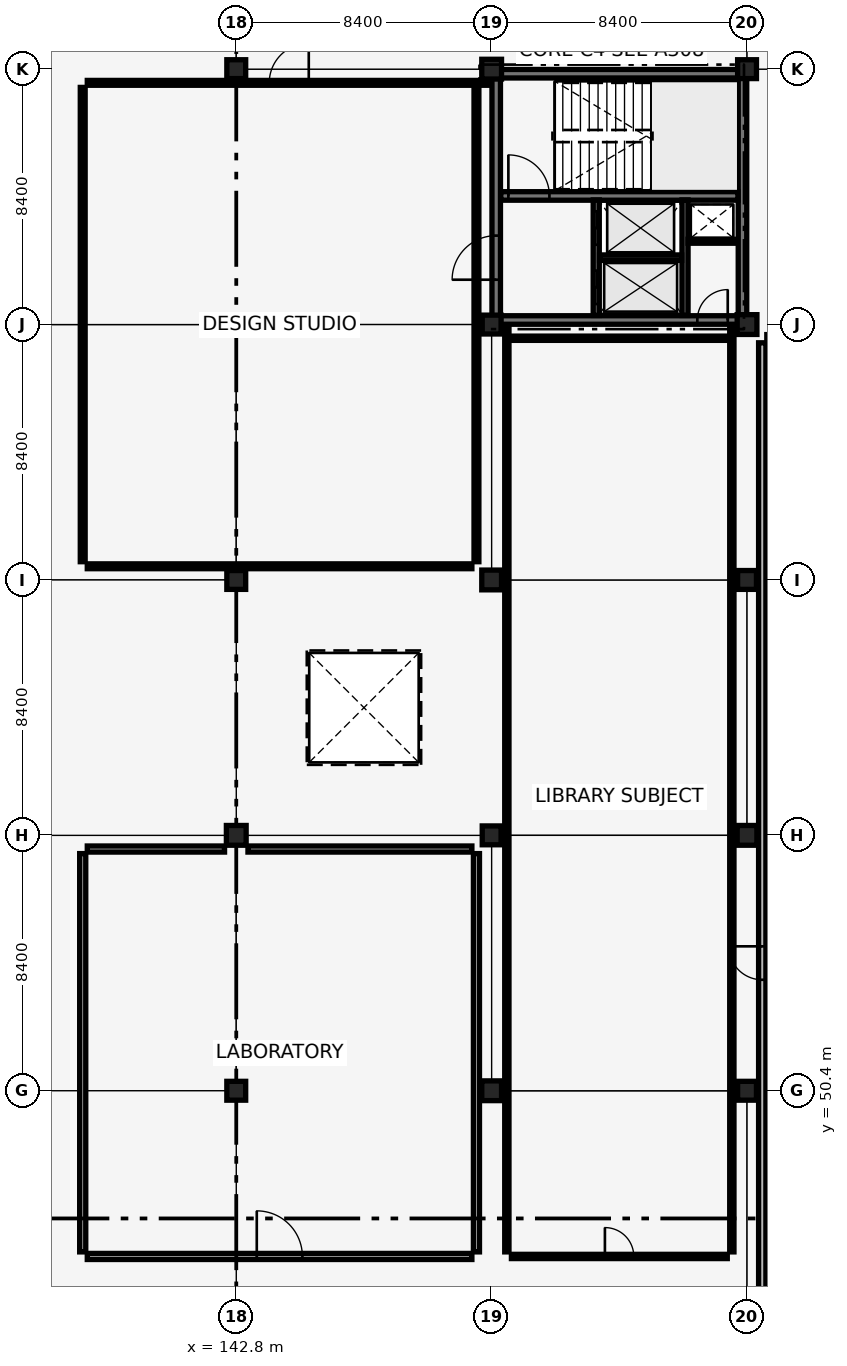
"""IFC4 building model, lengths in metres.
Left out: names, types, materials, properties, quantities, classifications, styles, units other than length and angle.
Written with IfcOpenShell. Run it as: python <this file> out.ifc"""

import sys

from ifc_helpers import new_model, si_unit, direction, frame, frame_2d, origin, origin_2d, place, context, subcontext, project, spatial, rectangle, extrude, element, fill, save


model = new_model("IFC4")
c1 = context("Model", 3, precision=1e-05, world=origin(), true_north=direction((0.0, 1.0)))
c2 = subcontext(c1, "Body", "Model", "MODEL_VIEW")
j1 = project(units=[si_unit("LENGTHUNIT", "METRE"), si_unit("PLANEANGLEUNIT", "RADIAN")], contexts=[c1])
p1 = place(None, origin())
s1 = spatial("IfcSite", under=j1, at=p1, CompositionType="ELEMENT")
p2 = place(p1, origin())
s2 = spatial("IfcBuilding", under=s1, at=p2, CompositionType="ELEMENT")
p3 = place(p2, frame((0.0, 0.0, 13.94)))
s3 = spatial("IfcBuildingStorey", under=s2, at=p3, CompositionType="ELEMENT", Elevation=13.94)
p4 = place(p3, frame((151.35, 75.75, 0.0), z_axis=(0.0, 0.0, 1.0), x_axis=(1.0, 0.0, 0.0)))
e1 = element("IfcWall", 1, at=p4, inside=s3, PredefinedType="SHEAR", context=c2, shape_type="SweptSolid", body=[
    extrude(rectangle(XDim=8.1, YDim=0.28, at=frame_2d((4.05, 0.0))), origin(), (0.0, 0.0, 1.0), 3.78),
])
p5 = place(p4, frame((6.615, 0.0, 0.0)))
e2 = element("IfcOpeningElement", 2, at=p5, cuts=e1, PredefinedType="OPENING", context=c2, shape_type="SweptSolid", body=[
    extrude(rectangle(XDim=1.0, YDim=2.15, at=frame_2d((0.5, 1.075))), frame((0.0, 0.15, 0.0), z_axis=(0.0, -1.0, 0.0), x_axis=(1.0, 0.0, 0.0)), (0.0, 0.0, 1.0), 0.3),
])
p6 = place(p3, frame((151.35, 83.85, 0.0), z_axis=(0.0, 0.0, 1.0), x_axis=(1.0, 0.0, 0.0)))
e3 = element("IfcWall", 3, at=p6, inside=s3, PredefinedType="SHEAR", context=c2, shape_type="SweptSolid", body=[
    extrude(rectangle(XDim=8.1, YDim=0.28, at=frame_2d((4.05, 0.0))), origin(), (0.0, 0.0, 1.0), 3.78),
])
p7 = place(p3, frame((151.35, 75.75, 0.0), z_axis=(0.0, 0.0, 1.0), x_axis=(0.0, 1.0, 0.0)))
e4 = element("IfcWall", 4, at=p7, inside=s3, PredefinedType="SHEAR", context=c2, shape_type="SweptSolid", body=[
    extrude(rectangle(XDim=8.1, YDim=0.28, at=frame_2d((4.05, 0.0))), origin(), (0.0, 0.0, 1.0), 3.78),
])
p8 = place(p7, frame((1.325, 0.0, 0.0)))
e5 = element("IfcOpeningElement", 5, at=p8, cuts=e4, PredefinedType="OPENING", context=c2, shape_type="SweptSolid", body=[
    extrude(rectangle(XDim=1.45, YDim=2.15, at=frame_2d((0.725, 1.075))), frame((0.0, 0.15, 0.0), z_axis=(0.0, -1.0, 0.0), x_axis=(1.0, 0.0, 0.0)), (0.0, 0.0, 1.0), 0.3),
])
p9 = place(p3, frame((159.45, 75.75, 0.0), z_axis=(0.0, 0.0, 1.0), x_axis=(0.0, 1.0, 0.0)))
e6 = element("IfcWall", 6, at=p9, inside=s3, PredefinedType="SHEAR", context=c2, shape_type="SweptSolid", body=[
    extrude(rectangle(XDim=8.1, YDim=0.28, at=frame_2d((4.05, 0.0))), origin(), (0.0, 0.0, 1.0), 3.78),
])
p10 = place(p3, frame((151.5, 79.83, 0.0), z_axis=(0.0, 0.0, 1.0), x_axis=(1.0, 0.0, 0.0)))
e7 = element("IfcWall", 7, at=p10, inside=s3, PredefinedType="SHEAR", context=c2, shape_type="SweptSolid", body=[
    extrude(rectangle(XDim=7.8, YDim=0.28, at=frame_2d((3.9, 0.0))), origin(), (0.0, 0.0, 1.0), 3.78),
])
p11 = place(p10, frame((0.25, 0.0, 0.0)))
e8 = element("IfcOpeningElement", 8, at=p11, cuts=e7, PredefinedType="OPENING", context=c2, shape_type="SweptSolid", body=[
    extrude(rectangle(XDim=1.35, YDim=2.15, at=frame_2d((0.675, 1.075))), frame((0.0, 0.15, 0.0), z_axis=(0.0, -1.0, 0.0), x_axis=(1.0, 0.0, 0.0)), (0.0, 0.0, 1.0), 0.3),
])
p12 = place(p3, frame((142.8, 50.4, 0.0), z_axis=(0.0, 0.0, 1.0), x_axis=(1.0, 0.0, 0.0)))
e9 = element("IfcColumn", 9, at=p12, inside=s3, PredefinedType="COLUMN", context=c2, shape_type="SweptSolid", body=[
    extrude(rectangle(XDim=0.62, YDim=0.62, at=origin_2d()), origin(), (0.0, 0.0, 1.0), 3.78),
])
p13 = place(p3, frame((142.8, 58.8, 0.0), z_axis=(0.0, 0.0, 1.0), x_axis=(1.0, 0.0, 0.0)))
e10 = element("IfcColumn", 10, at=p13, inside=s3, PredefinedType="COLUMN", context=c2, shape_type="SweptSolid", body=[
    extrude(rectangle(XDim=0.65, YDim=0.65, at=origin_2d()), origin(), (0.0, 0.0, 1.0), 3.78),
])
p14 = place(p3, frame((142.8, 67.2, 0.0), z_axis=(0.0, 0.0, 1.0), x_axis=(1.0, 0.0, 0.0)))
e11 = element("IfcColumn", 11, at=p14, inside=s3, PredefinedType="COLUMN", context=c2, shape_type="SweptSolid", body=[
    extrude(rectangle(XDim=0.62, YDim=0.62, at=origin_2d()), origin(), (0.0, 0.0, 1.0), 3.78),
])
p15 = place(p3, frame((142.8, 75.6, 0.0), z_axis=(0.0, 0.0, 1.0), x_axis=(1.0, 0.0, 0.0)))
e12 = element("IfcColumn", 12, at=p15, inside=s3, PredefinedType="COLUMN", context=c2, shape_type="SweptSolid", body=[
    extrude(rectangle(XDim=0.65, YDim=0.65, at=origin_2d()), origin(), (0.0, 0.0, 1.0), 3.78),
])
p16 = place(p3, frame((142.8, 84.0, 0.0), z_axis=(0.0, 0.0, 1.0), x_axis=(1.0, 0.0, 0.0)))
e13 = element("IfcColumn", 13, at=p16, inside=s3, PredefinedType="COLUMN", context=c2, shape_type="SweptSolid", body=[
    extrude(rectangle(XDim=0.62, YDim=0.62, at=origin_2d()), origin(), (0.0, 0.0, 1.0), 3.78),
])
p17 = place(p3, frame((151.2, 50.4, 0.0), z_axis=(0.0, 0.0, 1.0), x_axis=(1.0, 0.0, 0.0)))
e14 = element("IfcColumn", 14, at=p17, inside=s3, PredefinedType="COLUMN", context=c2, shape_type="SweptSolid", body=[
    extrude(rectangle(XDim=0.65, YDim=0.65, at=origin_2d()), origin(), (0.0, 0.0, 1.0), 3.78),
])
p18 = place(p3, frame((151.2, 58.8, 0.0), z_axis=(0.0, 0.0, 1.0), x_axis=(1.0, 0.0, 0.0)))
e15 = element("IfcColumn", 15, at=p18, inside=s3, PredefinedType="COLUMN", context=c2, shape_type="SweptSolid", body=[
    extrude(rectangle(XDim=0.62, YDim=0.62, at=origin_2d()), origin(), (0.0, 0.0, 1.0), 3.78),
])
p19 = place(p3, frame((151.2, 67.2, 0.0), z_axis=(0.0, 0.0, 1.0), x_axis=(1.0, 0.0, 0.0)))
e16 = element("IfcColumn", 16, at=p19, inside=s3, PredefinedType="COLUMN", context=c2, shape_type="SweptSolid", body=[
    extrude(rectangle(XDim=0.65, YDim=0.65, at=origin_2d()), origin(), (0.0, 0.0, 1.0), 3.78),
])
p20 = place(p3, frame((151.2, 75.6, 0.0), z_axis=(0.0, 0.0, 1.0), x_axis=(1.0, 0.0, 0.0)))
e17 = element("IfcColumn", 17, at=p20, inside=s3, PredefinedType="COLUMN", context=c2, shape_type="SweptSolid", body=[
    extrude(rectangle(XDim=0.62, YDim=0.62, at=origin_2d()), origin(), (0.0, 0.0, 1.0), 3.78),
])
p21 = place(p3, frame((151.2, 84.0, 0.0), z_axis=(0.0, 0.0, 1.0), x_axis=(1.0, 0.0, 0.0)))
e18 = element("IfcColumn", 18, at=p21, inside=s3, PredefinedType="COLUMN", context=c2, shape_type="SweptSolid", body=[
    extrude(rectangle(XDim=0.65, YDim=0.65, at=origin_2d()), origin(), (0.0, 0.0, 1.0), 3.78),
])
p22 = place(p3, frame((159.6, 50.4, 0.0), z_axis=(0.0, 0.0, 1.0), x_axis=(1.0, 0.0, 0.0)))
e19 = element("IfcColumn", 19, at=p22, inside=s3, PredefinedType="COLUMN", context=c2, shape_type="SweptSolid", body=[
    extrude(rectangle(XDim=0.62, YDim=0.62, at=origin_2d()), origin(), (0.0, 0.0, 1.0), 3.78),
])
p23 = place(p3, frame((159.6, 58.8, 0.0), z_axis=(0.0, 0.0, 1.0), x_axis=(1.0, 0.0, 0.0)))
e20 = element("IfcColumn", 20, at=p23, inside=s3, PredefinedType="COLUMN", context=c2, shape_type="SweptSolid", body=[
    extrude(rectangle(XDim=0.65, YDim=0.65, at=origin_2d()), origin(), (0.0, 0.0, 1.0), 3.78),
])
p24 = place(p3, frame((159.6, 67.2, 0.0), z_axis=(0.0, 0.0, 1.0), x_axis=(1.0, 0.0, 0.0)))
e21 = element("IfcColumn", 21, at=p24, inside=s3, PredefinedType="COLUMN", context=c2, shape_type="SweptSolid", body=[
    extrude(rectangle(XDim=0.62, YDim=0.62, at=origin_2d()), origin(), (0.0, 0.0, 1.0), 3.78),
])
p25 = place(p3, frame((159.6, 75.6, 0.0), z_axis=(0.0, 0.0, 1.0), x_axis=(1.0, 0.0, 0.0)))
e22 = element("IfcColumn", 22, at=p25, inside=s3, PredefinedType="COLUMN", context=c2, shape_type="SweptSolid", body=[
    extrude(rectangle(XDim=0.65, YDim=0.65, at=origin_2d()), origin(), (0.0, 0.0, 1.0), 3.78),
])
p26 = place(p3, frame((159.6, 84.0, 0.0), z_axis=(0.0, 0.0, 1.0), x_axis=(1.0, 0.0, 0.0)))
e23 = element("IfcColumn", 23, at=p26, inside=s3, PredefinedType="COLUMN", context=c2, shape_type="SweptSolid", body=[
    extrude(rectangle(XDim=0.62, YDim=0.62, at=origin_2d()), origin(), (0.0, 0.0, 1.0), 3.78),
])
p27 = place(p3, frame((154.64, 75.9, 0.0), z_axis=(0.0, 0.0, 1.0), x_axis=(0.0, 1.0, 0.0)))
e24 = element("IfcWall", 24, at=p27, inside=s3, PredefinedType="SHEAR", context=c2, shape_type="SweptSolid", body=[
    extrude(rectangle(XDim=3.8, YDim=0.2, at=frame_2d((1.9, 0.0))), origin(), (0.0, 0.0, 1.0), 3.78),
])
p28 = place(p27, frame((0.375, 0.0, 0.0)))
e25 = element("IfcOpeningElement", 25, at=p28, cuts=e24, PredefinedType="OPENING", context=c2, shape_type="SweptSolid", body=[
    extrude(rectangle(XDim=1.1, YDim=2.15, at=frame_2d((0.55, 1.075))), frame((0.0, 0.11, 0.0), z_axis=(0.0, -1.0, 0.0), x_axis=(1.0, 0.0, 0.0)), (0.0, 0.0, 1.0), 0.22),
])
p29 = place(p27, frame((2.325, 0.0, 0.0)))
e26 = element("IfcOpeningElement", 26, at=p29, cuts=e24, PredefinedType="OPENING", context=c2, shape_type="SweptSolid", body=[
    extrude(rectangle(XDim=1.1, YDim=2.15, at=frame_2d((0.55, 1.075))), frame((0.0, 0.11, 0.0), z_axis=(0.0, -1.0, 0.0), x_axis=(1.0, 0.0, 0.0)), (0.0, 0.0, 1.0), 0.22),
])
p30 = place(p3, frame((157.56, 75.9, 0.0), z_axis=(0.0, 0.0, 1.0), x_axis=(0.0, 1.0, 0.0)))
e27 = element("IfcWall", 27, at=p30, inside=s3, PredefinedType="SHEAR", context=c2, shape_type="SweptSolid", body=[
    extrude(rectangle(XDim=3.8, YDim=0.2, at=frame_2d((1.9, 0.0))), origin(), (0.0, 0.0, 1.0), 3.78),
])
p31 = place(p3, frame((154.75, 77.8, 0.0), z_axis=(0.0, 0.0, 1.0), x_axis=(1.0, 0.0, 0.0)))
e28 = element("IfcWall", 28, at=p31, inside=s3, PredefinedType="SHEAR", context=c2, shape_type="SweptSolid", body=[
    extrude(rectangle(XDim=2.7, YDim=0.18, at=frame_2d((1.35, 0.0))), origin(), (0.0, 0.0, 1.0), 3.78),
])
p32 = place(p3, frame((157.66, 78.34, 0.0), z_axis=(0.0, 0.0, 1.0), x_axis=(1.0, 0.0, 0.0)))
e29 = element("IfcWall", 29, at=p32, inside=s3, PredefinedType="PARTITIONING", context=c2, shape_type="SweptSolid", body=[
    extrude(rectangle(XDim=1.62, YDim=0.13, at=frame_2d((0.81, 0.0))), origin(), (0.0, 0.0, 1.0), 3.78),
])
p33 = place(p3, frame((160.1, 34.2, 0.0), z_axis=(0.0, 0.0, 1.0), x_axis=(0.0, 1.0, 0.0)))
e30 = element("IfcWall", 30, at=p33, inside=s3, PredefinedType="PARTITIONING", context=c2, shape_type="SweptSolid", body=[
    extrude(rectangle(XDim=40.8, YDim=0.24, at=frame_2d((20.4, 0.0))), origin(), (0.0, 0.0, 1.0), 3.05),
])
p34 = place(p33, frame((19.85, 0.0, 0.0)))
e31 = element("IfcOpeningElement", 31, at=p34, cuts=e30, PredefinedType="OPENING", context=c2, shape_type="SweptSolid", body=[
    extrude(rectangle(XDim=1.1, YDim=2.15, at=frame_2d((0.55, 1.075))), frame((0.0, 0.13, 0.0), z_axis=(0.0, -1.0, 0.0), x_axis=(1.0, 0.0, 0.0)), (0.0, 0.0, 1.0), 0.26),
])
p35 = place(p3, frame((160.25, 75.15, 0.0), z_axis=(0.0, 0.0, 1.0), x_axis=(1.0, 0.0, 0.0)))
e32 = element("IfcWall", 32, at=p35, inside=s3, PredefinedType="PARTITIONING", context=c2, shape_type="SweptSolid", body=[
    extrude(rectangle(XDim=7.47, YDim=0.24, at=frame_2d((3.735, 0.0))), origin(), (0.0, 0.0, 1.0), 3.15),
])
p36 = place(p3, frame((137.9, 44.95, 0.0), z_axis=(0.0, 0.0, 1.0), x_axis=(1.0, 0.0, 0.0)))
e33 = element("IfcWall", 33, at=p36, inside=s3, PredefinedType="PARTITIONING", context=c2, shape_type="SweptSolid", body=[
    extrude(rectangle(XDim=12.65, YDim=0.2, at=frame_2d((6.325, 0.0))), origin(), (0.0, 0.0, 1.0), 3.35),
])
p37 = place(p36, frame((5.575, 0.0, 0.0)))
e34 = element("IfcOpeningElement", 34, at=p37, cuts=e33, PredefinedType="OPENING", context=c2, shape_type="SweptSolid", body=[
    extrude(rectangle(XDim=1.5, YDim=2.2, at=frame_2d((0.75, 1.1))), frame((0.0, 0.11, 0.0), z_axis=(0.0, -1.0, 0.0), x_axis=(1.0, 0.0, 0.0)), (0.0, 0.0, 1.0), 0.22),
])
p38 = place(p3, frame((137.75, 45.1, 0.0), z_axis=(0.0, 0.0, 1.0), x_axis=(0.0, 1.0, 0.0)))
e35 = element("IfcWall", 35, at=p38, inside=s3, PredefinedType="PARTITIONING", context=c2, shape_type="SweptSolid", body=[
    extrude(rectangle(XDim=13.1, YDim=0.2, at=frame_2d((6.55, 0.0))), origin(), (0.0, 0.0, 1.0), 3.05),
])
p39 = place(p3, frame((137.9, 58.35, 0.0), z_axis=(0.0, 0.0, 1.0), x_axis=(1.0, 0.0, 0.0)))
e36 = element("IfcWall", 36, at=p39, inside=s3, PredefinedType="PARTITIONING", context=c2, shape_type="SweptSolid", body=[
    extrude(rectangle(XDim=4.515, YDim=0.2, at=frame_2d((2.258, 0.0))), origin(), (0.0, 0.0, 1.0), 3.78),
])
p40 = place(p3, frame((143.185, 58.35, 0.0), z_axis=(0.0, 0.0, 1.0), x_axis=(1.0, 0.0, 0.0)))
e37 = element("IfcWall", 37, at=p40, inside=s3, PredefinedType="PARTITIONING", context=c2, shape_type="SweptSolid", body=[
    extrude(rectangle(XDim=7.365, YDim=0.2, at=frame_2d((3.683, 0.0))), origin(), (0.0, 0.0, 1.0), 3.78),
])
p41 = place(p3, frame((150.7, 45.1, 0.0), z_axis=(0.0, 0.0, 1.0), x_axis=(0.0, 1.0, 0.0)))
e38 = element("IfcWall", 38, at=p41, inside=s3, PredefinedType="PARTITIONING", context=c2, shape_type="SweptSolid", body=[
    extrude(rectangle(XDim=13.1, YDim=0.2, at=frame_2d((6.55, 0.0))), origin(), (0.0, 0.0, 1.0), 3.05),
])
p42 = place(p3, frame((137.9, 83.55, 0.0), z_axis=(0.0, 0.0, 1.0), x_axis=(1.0, 0.0, 0.0)))
e39 = element("IfcWall", 39, at=p42, inside=s3, PredefinedType="PARTITIONING", context=c2, shape_type="SweptSolid", body=[
    extrude(rectangle(XDim=13.27, YDim=0.16, at=frame_2d((6.635, 0.0))), origin(), (0.0, 0.0, 1.0), 3.1),
])
p43 = place(p42, frame((5.985, 0.0, 0.0)))
e40 = element("IfcOpeningElement", 40, at=p43, cuts=e39, PredefinedType="OPENING", context=c2, shape_type="SweptSolid", body=[
    extrude(rectangle(XDim=1.3, YDim=2.2, at=frame_2d((0.65, 1.1))), frame((0.0, 0.09, 0.0), z_axis=(0.0, -1.0, 0.0), x_axis=(1.0, 0.0, 0.0)), (0.0, 0.0, 1.0), 0.18),
])
for number, where, z_axis, x_axis in (
    (41, (137.75, 67.8, 0.0), (0.0, 0.0, 1.0), (0.0, 1.0, 0.0)),
    (42, (150.7, 67.8, 0.0), (0.0, 0.0, 1.0), (0.0, 1.0, 0.0)),
):
    element("IfcWall", number, at=place(p3, frame(where, z_axis=z_axis, x_axis=x_axis)), inside=s3, PredefinedType="PARTITIONING", context=c2, shape_type="SweptSolid", body=[
        extrude(rectangle(XDim=15.6, YDim=0.16, at=frame_2d((7.8, 0.0))), origin(), (0.0, 0.0, 1.0), 3.13),
    ])
p44 = place(p3, frame((137.9, 67.65, 0.0), z_axis=(0.0, 0.0, 1.0), x_axis=(1.0, 0.0, 0.0)))
e43 = element("IfcWall", 43, at=p44, inside=s3, PredefinedType="PARTITIONING", context=c2, shape_type="SweptSolid", body=[
    extrude(rectangle(XDim=12.65, YDim=0.16, at=frame_2d((6.325, 0.0))), origin(), (0.0, 0.0, 1.0), 3.35),
])
p45 = place(p3, frame((151.85, 44.95, 0.0), z_axis=(0.0, 0.0, 1.0), x_axis=(1.0, 0.0, 0.0)))
e44 = element("IfcWall", 44, at=p45, inside=s3, PredefinedType="PARTITIONING", context=c2, shape_type="SweptSolid", body=[
    extrude(rectangle(XDim=7.1, YDim=0.14, at=frame_2d((3.55, 0.0))), origin(), (0.0, 0.0, 1.0), 3.78),
])
p46 = place(p45, frame((3.075, 0.0, 0.0)))
e45 = element("IfcOpeningElement", 45, at=p46, cuts=e44, PredefinedType="OPENING", context=c2, shape_type="SweptSolid", body=[
    extrude(rectangle(XDim=0.95, YDim=2.1, at=frame_2d((0.475, 1.05))), frame((0.0, 0.08, 0.0), z_axis=(0.0, -1.0, 0.0), x_axis=(1.0, 0.0, 0.0)), (0.0, 0.0, 1.0), 0.16),
])
p47 = place(p3, frame((151.85, 75.15, 0.0), z_axis=(0.0, 0.0, 1.0), x_axis=(1.0, 0.0, 0.0)))
e46 = element("IfcWall", 46, at=p47, inside=s3, PredefinedType="PARTITIONING", context=c2, shape_type="SweptSolid", body=[
    extrude(rectangle(XDim=7.1, YDim=0.14, at=frame_2d((3.55, 0.0))), origin(), (0.0, 0.0, 1.0), 3.78),
])
for number, where, z_axis, x_axis in (
    (47, (151.7, 45.1, 0.0), (0.0, 0.0, 1.0), (0.0, 1.0, 0.0)),
    (48, (159.1, 45.1, 0.0), (0.0, 0.0, 1.0), (0.0, 1.0, 0.0)),
):
    element("IfcWall", number, at=place(p3, frame(where, z_axis=z_axis, x_axis=x_axis)), inside=s3, PredefinedType="PARTITIONING", context=c2, shape_type="SweptSolid", body=[
        extrude(rectangle(XDim=30.47, YDim=0.14, at=frame_2d((15.235, 0.0))), origin(), (0.0, 0.0, 1.0), 3.05),
    ])
p48 = place(p11, origin())
e49 = element("IfcDoor", 49, at=p48, inside=s3, OperationType="SINGLE_SWING_LEFT", PredefinedType="DOOR", context=c2, shape_type="SweptSolid", body=[
    extrude(rectangle(XDim=1.35, YDim=2.15, at=frame_2d((0.675, 1.075))), frame((0.0, 0.025, 0.0), z_axis=(0.0, -1.0, 0.0), x_axis=(1.0, 0.0, 0.0)), (0.0, 0.0, 1.0), 0.05),
])
fill(e8, e49)
p49 = place(p28, origin())
e50 = element("IfcDoor", 50, at=p49, inside=s3, OperationType="SLIDING_TO_LEFT", PredefinedType="DOOR", context=c2, shape_type="SweptSolid", body=[
    extrude(rectangle(XDim=1.1, YDim=2.15, at=frame_2d((0.55, 1.075))), frame((0.0, 0.025, 0.0), z_axis=(0.0, -1.0, 0.0), x_axis=(1.0, 0.0, 0.0)), (0.0, 0.0, 1.0), 0.05),
])
fill(e25, e50)
p50 = place(p29, origin())
e51 = element("IfcDoor", 51, at=p50, inside=s3, OperationType="SLIDING_TO_LEFT", PredefinedType="DOOR", context=c2, shape_type="SweptSolid", body=[
    extrude(rectangle(XDim=1.1, YDim=2.15, at=frame_2d((0.55, 1.075))), frame((0.0, 0.025, 0.0), z_axis=(0.0, -1.0, 0.0), x_axis=(1.0, 0.0, 0.0)), (0.0, 0.0, 1.0), 0.05),
])
fill(e26, e51)
p51 = place(p8, origin())
e52 = element("IfcDoor", 52, at=p51, inside=s3, OperationType="DOUBLE_DOOR_SINGLE_SWING", PredefinedType="DOOR", context=c2, shape_type="SweptSolid", body=[
    extrude(rectangle(XDim=1.45, YDim=2.15, at=frame_2d((0.725, 1.075))), frame((0.0, 0.025, 0.0), z_axis=(0.0, -1.0, 0.0), x_axis=(1.0, 0.0, 0.0)), (0.0, 0.0, 1.0), 0.05),
])
fill(e5, e52)
p52 = place(p5, origin())
e53 = element("IfcDoor", 53, at=p52, inside=s3, OperationType="SINGLE_SWING_RIGHT", PredefinedType="DOOR", context=c2, shape_type="SweptSolid", body=[
    extrude(rectangle(XDim=1.0, YDim=2.15, at=frame_2d((0.5, 1.075))), frame((0.0, 0.025, 0.0), z_axis=(0.0, -1.0, 0.0), x_axis=(1.0, 0.0, 0.0)), (0.0, 0.0, 1.0), 0.05),
])
fill(e2, e53)
p53 = place(p34, origin())
e54 = element("IfcDoor", 54, at=p53, inside=s3, OperationType="SINGLE_SWING_RIGHT", PredefinedType="DOOR", context=c2, shape_type="SweptSolid", body=[
    extrude(rectangle(XDim=1.1, YDim=2.15, at=frame_2d((0.55, 1.075))), frame((0.0, 0.025, 0.0), z_axis=(0.0, -1.0, 0.0), x_axis=(1.0, 0.0, 0.0)), (0.0, 0.0, 1.0), 0.05),
])
fill(e31, e54)
p54 = place(p37, origin())
e55 = element("IfcDoor", 55, at=p54, inside=s3, OperationType="DOUBLE_DOOR_SINGLE_SWING", PredefinedType="DOOR", context=c2, shape_type="SweptSolid", body=[
    extrude(rectangle(XDim=1.5, YDim=2.2, at=frame_2d((0.75, 1.1))), frame((0.0, 0.025, 0.0), z_axis=(0.0, -1.0, 0.0), x_axis=(1.0, 0.0, 0.0)), (0.0, 0.0, 1.0), 0.05),
])
fill(e34, e55)
p55 = place(p43, origin())
e56 = element("IfcDoor", 56, at=p55, inside=s3, OperationType="SINGLE_SWING_RIGHT", PredefinedType="DOOR", context=c2, shape_type="SweptSolid", body=[
    extrude(rectangle(XDim=1.3, YDim=2.2, at=frame_2d((0.65, 1.1))), frame((0.0, 0.025, 0.0), z_axis=(0.0, -1.0, 0.0), x_axis=(1.0, 0.0, 0.0)), (0.0, 0.0, 1.0), 0.05),
])
fill(e40, e56)
p56 = place(p46, origin())
e57 = element("IfcDoor", 57, at=p56, inside=s3, OperationType="SINGLE_SWING_LEFT", PredefinedType="DOOR", context=c2, shape_type="SweptSolid", body=[
    extrude(rectangle(XDim=0.95, YDim=2.1, at=frame_2d((0.475, 1.05))), frame((0.0, 0.025, 0.0), z_axis=(0.0, -1.0, 0.0), x_axis=(1.0, 0.0, 0.0)), (0.0, 0.0, 1.0), 0.05),
])
fill(e45, e57)
save(model, sys.argv[1])
